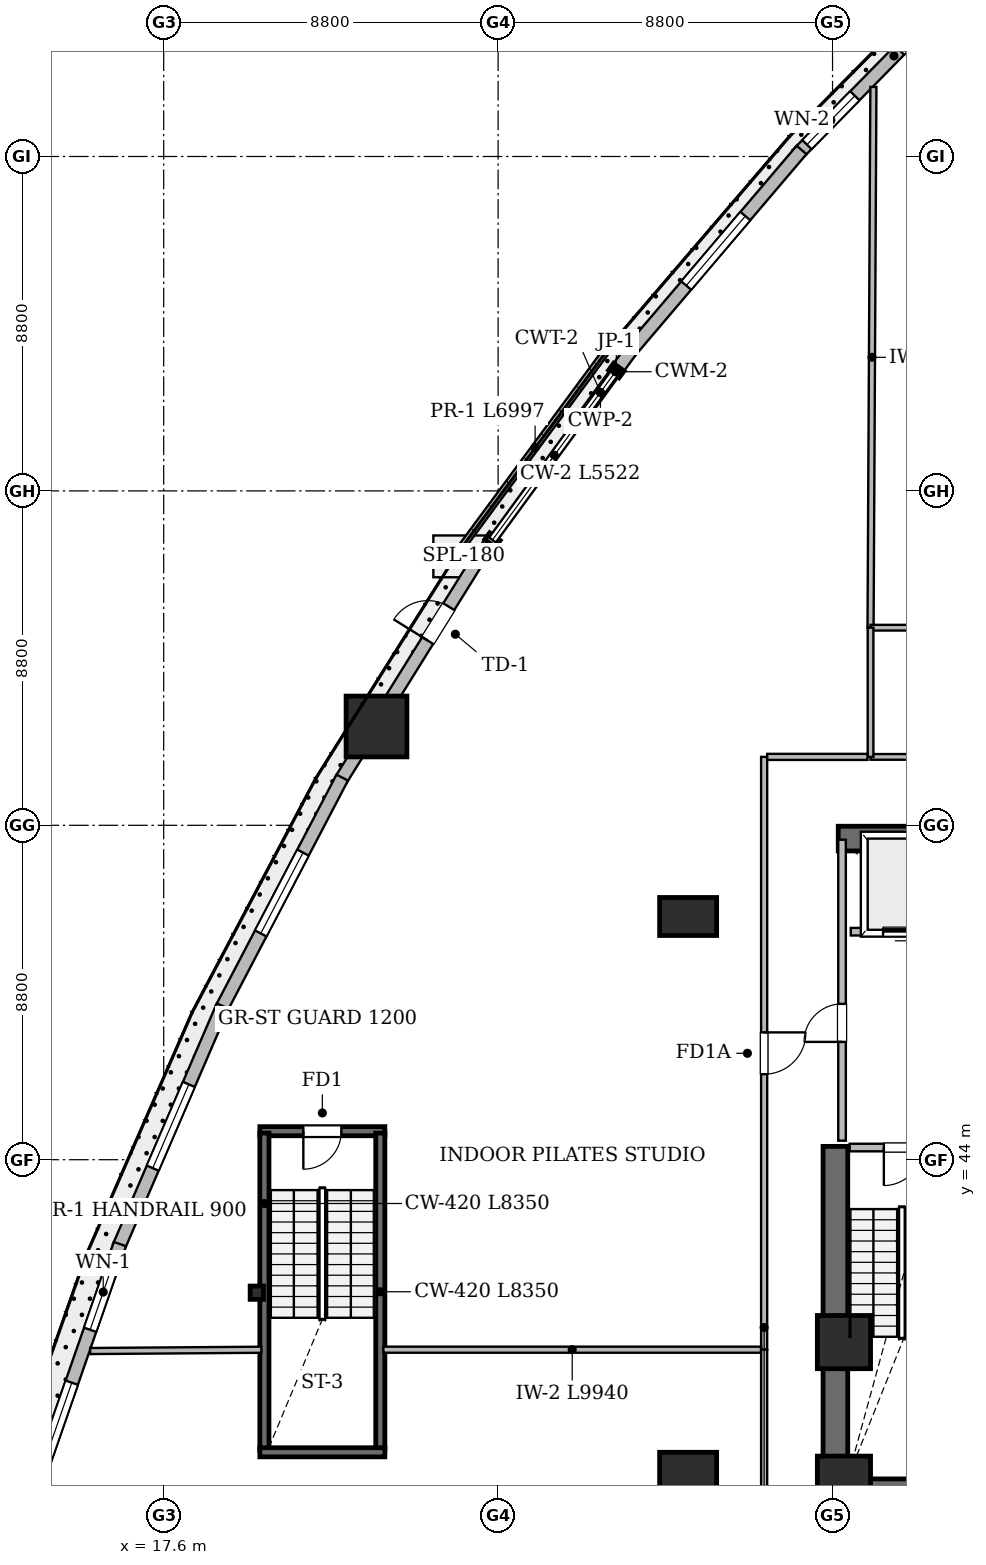
"""IFC4 building model, lengths in metres.
Left out: names, types, materials, properties, quantities, classifications, styles, units other than length and angle.
Written with IfcOpenShell. Run it as: python <this file> out.ifc"""

import sys

from ifc_helpers import new_model, si_unit, direction, frame, frame_2d, origin, origin_2d, place, context, subcontext, project, spatial, rectangle, i_section, extrude, element, fill, save


model = new_model("IFC4")
c1 = context("Model", 3, precision=1e-05, world=origin(), true_north=direction((0.0, 1.0)))
c2 = subcontext(c1, "Body", "Model", "MODEL_VIEW")
j1 = project(units=[si_unit("LENGTHUNIT", "METRE"), si_unit("PLANEANGLEUNIT", "RADIAN")], contexts=[c1])
p1 = place(None, origin())
s1 = spatial("IfcSite", under=j1, at=p1, CompositionType="ELEMENT")
p2 = place(p1, origin())
s2 = spatial("IfcBuilding", under=s1, at=p2, CompositionType="ELEMENT")
p3 = place(p2, frame((0.0, 0.0, 14.4)))
s3 = spatial("IfcBuildingStorey", under=s2, at=p3, CompositionType="ELEMENT", Elevation=14.4)
p4 = place(p3, frame((35.35, 52.45, 0.0), z_axis=(0.0, 0.0, 1.0), x_axis=(1.0, 0.0, 0.0)))
e1 = element("IfcWall", 1, at=p4, inside=s3, PredefinedType="SHEAR", context=c2, shape_type="SweptSolid", body=[
    extrude(rectangle(XDim=17.3, YDim=0.65, at=frame_2d((8.65, 0.0))), origin(), (0.0, 0.0, 1.0), 4.5),
])
p5 = place(p3, frame((34.95, 35.275, 0.0), z_axis=(0.0, 0.0, 1.0), x_axis=(1.0, 0.0, 0.0)))
e2 = element("IfcWall", 2, at=p5, inside=s3, PredefinedType="SHEAR", context=c2, shape_type="SweptSolid", body=[
    extrude(rectangle(XDim=4.15, YDim=0.65, at=frame_2d((2.075, 0.0))), origin(), (0.0, 0.0, 1.0), 4.5),
])
p6 = place(p3, frame((35.275, 34.95, 0.0), z_axis=(0.0, 0.0, 1.0), x_axis=(0.0, 1.0, 0.0)))
e3 = element("IfcWall", 3, at=p6, inside=s3, PredefinedType="SHEAR", context=c2, shape_type="SweptSolid", body=[
    extrude(rectangle(XDim=9.4, YDim=0.65, at=frame_2d((4.7, 0.0))), origin(), (0.0, 0.0, 1.0), 4.5),
])
for number, where, z_axis, x_axis in (
    (4, (35.5, 35.5, 0.0), (0.0, 0.0, 1.0), (1.0, 0.0, 0.0)),
    (5, (35.5, 39.2, 0.0), (0.0, 0.0, 1.0), (1.0, 0.0, 0.0)),
):
    element("IfcColumn", number, at=place(p3, frame(where, z_axis=z_axis, x_axis=x_axis)), inside=s3, PredefinedType="COLUMN", context=c2, shape_type="SweptSolid", body=[
        extrude(rectangle(XDim=1.4, YDim=1.4, at=origin_2d()), origin(), (0.0, 0.0, 1.0), 4.8),
    ])
for number, where, z_axis, x_axis in (
    (6, (31.4, 35.8, 0.0), (0.0, 0.0, 1.0), (1.0, 0.0, 0.0)),
    (7, (31.4, 50.4, 0.0), (0.0, 0.0, 1.0), (1.0, 0.0, 0.0)),
):
    element("IfcColumn", number, at=place(p3, frame(where, z_axis=z_axis, x_axis=x_axis)), inside=s3, PredefinedType="COLUMN", context=c2, shape_type="SweptSolid", body=[
        extrude(rectangle(XDim=1.5, YDim=1.0, at=origin_2d()), origin(), (0.0, 0.0, 1.0), 4.8),
    ])
p7 = place(p3, frame((23.2, 55.4, 0.0), z_axis=(0.0, 0.0, 1.0), x_axis=(1.0, 0.0, 0.0)))
e8 = element("IfcColumn", 8, at=p7, inside=s3, PredefinedType="COLUMN", context=c2, shape_type="SweptSolid", body=[
    extrude(rectangle(XDim=1.6, YDim=1.6, at=origin_2d()), origin(), (0.0, 0.0, 1.0), 4.8),
])
p8 = place(p3, frame((20.05, 40.5, 0.0), z_axis=(0.0, 0.0, 1.0), x_axis=(1.0, 0.0, 0.0)))
e9 = element("IfcColumn", 9, at=p8, inside=s3, PredefinedType="PILASTER", context=c2, shape_type="SweptSolid", body=[
    extrude(i_section(OverallWidth=0.35, OverallDepth=0.35, WebThickness=0.012, FlangeThickness=0.019, FilletRadius=0.02, at=origin_2d()), origin(), (0.0, 0.0, 1.0), 4.8),
])
p9 = place(p3, frame((39.296, 75.573, 0.0), z_axis=(0.0, 0.0, 1.0), x_axis=(-0.700436812806, -0.713714418564, 0.0)))
e10 = element("IfcWall", 10, at=p9, inside=s3, PredefinedType="SOLIDWALL", context=c2, shape_type="SweptSolid", body=[
    extrude(rectangle(XDim=7.079, YDim=0.34, at=frame_2d((3.54, 0.0))), origin(), (0.0, 0.0, 1.0), 4.5),
])
p10 = place(p9, frame((0.931, 0.0, 0.75)))
e11 = element("IfcOpeningElement", 11, at=p10, cuts=e10, PredefinedType="OPENING", context=c2, shape_type="SweptSolid", body=[
    extrude(rectangle(XDim=2.4, YDim=2.2, at=frame_2d((1.2, 1.1))), frame((0.0, 0.18, 0.0), z_axis=(0.0, -1.0, 0.0), x_axis=(1.0, 0.0, 0.0)), (0.0, 0.0, 1.0), 0.36),
])
p11 = place(p9, frame((5.01, 0.0, 0.8)))
e12 = element("IfcOpeningElement", 12, at=p11, cuts=e10, PredefinedType="OPENING", context=c2, shape_type="SweptSolid", body=[
    extrude(rectangle(XDim=1.8, YDim=1.65, at=frame_2d((0.9, 0.825))), frame((0.0, 0.18, 0.0), z_axis=(0.0, -1.0, 0.0), x_axis=(1.0, 0.0, 0.0)), (0.0, 0.0, 1.0), 0.36),
])
p12 = place(p3, frame((34.385, 70.572, 0.0), z_axis=(0.0, 0.0, 1.0), x_axis=(-0.6477796117, -0.761827785439, 0.0)))
e13 = element("IfcWall", 13, at=p12, inside=s3, PredefinedType="SOLIDWALL", context=c2, shape_type="SweptSolid", body=[
    extrude(rectangle(XDim=6.968, YDim=0.34, at=frame_2d((3.484, 0.0))), origin(), (0.0, 0.0, 1.0), 4.5),
])
p13 = place(p12, frame((2.284, 0.0, 0.75)))
e14 = element("IfcOpeningElement", 14, at=p13, cuts=e13, PredefinedType="OPENING", context=c2, shape_type="SweptSolid", body=[
    extrude(rectangle(XDim=2.4, YDim=2.2, at=frame_2d((1.2, 1.1))), frame((0.0, 0.18, 0.0), z_axis=(0.0, -1.0, 0.0), x_axis=(1.0, 0.0, 0.0)), (0.0, 0.0, 1.0), 0.36),
])
p14 = place(p3, frame((29.915, 65.319, 0.0), z_axis=(0.0, 0.0, 1.0), x_axis=(-0.590146831247, -0.807295929365, 0.0)))
e15 = element("IfcWall", 15, at=p14, inside=s3, PredefinedType="SOLIDWALL", context=c2, shape_type="SweptSolid", body=[
    extrude(rectangle(XDim=0.705, YDim=0.34, at=frame_2d((0.353, 0.0))), origin(), (0.0, 0.0, 1.0), 4.5),
])
p15 = place(p3, frame((26.263, 60.324, 0.0), z_axis=(0.0, 0.0, 1.0), x_axis=(-0.590268133047, -0.807207241735, 0.0)))
e16 = element("IfcWall", 16, at=p15, inside=s3, PredefinedType="SOLIDWALL", context=c2, shape_type="SweptSolid", body=[
    extrude(rectangle(XDim=0.706, YDim=0.34, at=frame_2d((0.353, 0.0))), origin(), (0.0, 0.0, 1.0), 4.5),
])
p16 = place(p3, frame((25.886, 59.813, 0.0), z_axis=(0.0, 0.0, 1.0), x_axis=(-0.528464497626, -0.848955402097, 0.0)))
e17 = element("IfcWall", 17, at=p16, inside=s3, PredefinedType="SOLIDWALL", context=c2, shape_type="SweptSolid", body=[
    extrude(rectangle(XDim=6.854, YDim=0.34, at=frame_2d((3.427, 0.0))), origin(), (0.0, 0.0, 1.0), 3.688),
])
p17 = place(p16, frame((1.483, 0.0, 0.0)))
e18 = element("IfcOpeningElement", 18, at=p17, cuts=e17, PredefinedType="OPENING", context=c2, shape_type="SweptSolid", body=[
    extrude(rectangle(XDim=1.05, YDim=2.15, at=frame_2d((0.525, 1.075))), frame((0.0, 0.18, 0.0), z_axis=(0.0, -1.0, 0.0), x_axis=(1.0, 0.0, 0.0)), (0.0, 0.0, 1.0), 0.36),
])
p18 = place(p3, frame((22.298, 54.055, 0.0), z_axis=(0.0, 0.0, 1.0), x_axis=(-0.463368013034, -0.886165946365, 0.0)))
e19 = element("IfcWall", 19, at=p18, inside=s3, PredefinedType="SOLIDWALL", context=c2, shape_type="SweptSolid", body=[
    extrude(rectangle(XDim=6.854, YDim=0.34, at=frame_2d((3.427, 0.0))), origin(), (0.0, 0.0, 1.0), 4.5),
])
p19 = place(p18, frame((2.227, 0.0, 0.75)))
e20 = element("IfcOpeningElement", 20, at=p19, cuts=e19, PredefinedType="OPENING", context=c2, shape_type="SweptSolid", body=[
    extrude(rectangle(XDim=2.4, YDim=2.2, at=frame_2d((1.2, 1.1))), frame((0.0, 0.18, 0.0), z_axis=(0.0, -1.0, 0.0), x_axis=(1.0, 0.0, 0.0)), (0.0, 0.0, 1.0), 0.36),
])
p20 = place(p3, frame((19.152, 48.044, 0.0), z_axis=(0.0, 0.0, 1.0), x_axis=(-0.396089940266, -0.91821171808, 0.0)))
e21 = element("IfcWall", 21, at=p20, inside=s3, PredefinedType="SOLIDWALL", context=c2, shape_type="SweptSolid", body=[
    extrude(rectangle(XDim=6.892, YDim=0.34, at=frame_2d((3.446, 0.0))), origin(), (0.0, 0.0, 1.0), 4.5),
])
p21 = place(p20, frame((2.246, 0.0, 0.75)))
e22 = element("IfcOpeningElement", 22, at=p21, cuts=e21, PredefinedType="OPENING", context=c2, shape_type="SweptSolid", body=[
    extrude(rectangle(XDim=2.4, YDim=2.2, at=frame_2d((1.2, 1.1))), frame((0.0, 0.18, 0.0), z_axis=(0.0, -1.0, 0.0), x_axis=(1.0, 0.0, 0.0)), (0.0, 0.0, 1.0), 0.36),
])
p22 = place(p3, frame((16.448, 41.781, 0.0), z_axis=(0.0, 0.0, 1.0), x_axis=(-0.327819293653, -0.944740446212, 0.0)))
e23 = element("IfcWall", 23, at=p22, inside=s3, PredefinedType="SOLIDWALL", context=c2, shape_type="SweptSolid", body=[
    extrude(rectangle(XDim=6.968, YDim=0.34, at=frame_2d((3.484, 0.0))), origin(), (0.0, 0.0, 1.0), 4.5),
])
p23 = place(p22, frame((0.288, 0.0, 0.8)))
e24 = element("IfcOpeningElement", 24, at=p23, cuts=e23, PredefinedType="OPENING", context=c2, shape_type="SweptSolid", body=[
    extrude(rectangle(XDim=2.1, YDim=1.7, at=frame_2d((1.05, 0.85))), frame((0.0, 0.18, 0.0), z_axis=(0.0, -1.0, 0.0), x_axis=(1.0, 0.0, 0.0)), (0.0, 0.0, 1.0), 0.36),
])
p24 = place(p22, frame((3.862, 0.0, 0.75)))
e25 = element("IfcOpeningElement", 25, at=p24, cuts=e23, PredefinedType="OPENING", context=c2, shape_type="SweptSolid", body=[
    extrude(rectangle(XDim=2.4, YDim=2.2, at=frame_2d((1.2, 1.1))), frame((0.0, 0.18, 0.0), z_axis=(0.0, -1.0, 0.0), x_axis=(1.0, 0.0, 0.0)), (0.0, 0.0, 1.0), 0.36),
])
p25 = place(p3, frame((29.451, 65.558, 0.0), z_axis=(0.0, 0.0, 1.0), x_axis=(-0.593678581032, -0.804702269429, 0.0)))
e26 = element("IfcWall", 26, at=p25, inside=s3, PredefinedType="PARAPET", context=c2, shape_type="SweptSolid", body=[
    extrude(rectangle(XDim=6.997, YDim=0.18, at=frame_2d((3.499, 0.0))), origin(), (0.0, 0.0, 1.0), 0.45),
])
p26 = place(p3, frame((20.13, 44.75, 0.0), z_axis=(0.0, 0.0, 1.0), x_axis=(1.0, 0.0, 0.0)))
e27 = element("IfcWall", 27, at=p26, inside=s3, PredefinedType="SHEAR", context=c2, shape_type="SweptSolid", body=[
    extrude(rectangle(XDim=3.29, YDim=0.24, at=frame_2d((1.645, 0.0))), origin(), (0.0, 0.0, 1.0), 4.5),
])
p27 = place(p26, frame((1.145, 0.0, 0.0)))
e28 = element("IfcOpeningElement", 28, at=p27, cuts=e27, PredefinedType="OPENING", context=c2, shape_type="SweptSolid", body=[
    extrude(rectangle(XDim=1.0, YDim=2.15, at=frame_2d((0.5, 1.075))), frame((0.0, 0.13, 0.0), z_axis=(0.0, -1.0, 0.0), x_axis=(1.0, 0.0, 0.0)), (0.0, 0.0, 1.0), 0.26),
])
for number, where, z_axis, x_axis in (
    (29, (20.25, 36.35, 0.0), (0.0, 0.0, 1.0), (0.0, 1.0, 0.0)),
    (30, (23.3, 36.35, 0.0), (0.0, 0.0, 1.0), (0.0, 1.0, 0.0)),
):
    element("IfcWall", number, at=place(p3, frame(where, z_axis=z_axis, x_axis=x_axis)), inside=s3, PredefinedType="SHEAR", context=c2, shape_type="SweptSolid", body=[
        extrude(rectangle(XDim=8.35, YDim=0.24, at=frame_2d((4.175, 0.0))), origin(), (0.0, 0.0, 1.0), 4.5),
    ])
p28 = place(p3, frame((20.13, 36.3, 0.0), z_axis=(0.0, 0.0, 1.0), x_axis=(1.0, 0.0, 0.0)))
e31 = element("IfcWall", 31, at=p28, inside=s3, PredefinedType="SHEAR", context=c2, shape_type="SweptSolid", body=[
    extrude(rectangle(XDim=3.29, YDim=0.24, at=frame_2d((1.645, 0.0))), origin(), (0.0, 0.0, 1.0), 4.5),
])
p29 = place(p3, frame((33.4, 54.6, 0.0), z_axis=(0.0, 0.0, 1.0), x_axis=(0.0, -1.0, 0.0)))
e32 = element("IfcWall", 32, at=p29, inside=s3, PredefinedType="SOLIDWALL", context=c2, shape_type="SweptSolid", body=[
    extrude(rectangle(XDim=15.6, YDim=0.16, at=frame_2d((7.8, 0.0))), origin(), (0.0, 0.0, 1.0), 3.688),
])
p30 = place(p29, frame((7.25, 0.0, 0.0)))
e33 = element("IfcOpeningElement", 33, at=p30, cuts=e32, PredefinedType="OPENING", context=c2, shape_type="SweptSolid", body=[
    extrude(rectangle(XDim=1.1, YDim=2.15, at=frame_2d((0.55, 1.075))), frame((0.0, 0.09, 0.0), z_axis=(0.0, -1.0, 0.0), x_axis=(1.0, 0.0, 0.0)), (0.0, 0.0, 1.0), 0.18),
])
p31 = place(p3, frame((35.45, 44.5, 0.0), z_axis=(0.0, 0.0, 1.0), x_axis=(0.0, 1.0, 0.0)))
e34 = element("IfcWall", 34, at=p31, inside=s3, PredefinedType="SOLIDWALL", context=c2, shape_type="SweptSolid", body=[
    extrude(rectangle(XDim=7.92, YDim=0.2, at=frame_2d((3.96, 0.0))), origin(), (0.0, 0.0, 1.0), 4.5),
])
p32 = place(p31, frame((2.6, 0.0, 0.0)))
e35 = element("IfcOpeningElement", 35, at=p32, cuts=e34, PredefinedType="OPENING", context=c2, shape_type="SweptSolid", body=[
    extrude(rectangle(XDim=1.0, YDim=2.15, at=frame_2d((0.5, 1.075))), frame((0.0, 0.11, 0.0), z_axis=(0.0, -1.0, 0.0), x_axis=(1.0, 0.0, 0.0)), (0.0, 0.0, 1.0), 0.22),
])
p33 = place(p3, frame((40.0, 54.6, 0.0), z_axis=(0.0, 0.0, 1.0), x_axis=(-1.0, 0.0, 0.0)))
e36 = element("IfcWall", 36, at=p33, inside=s3, PredefinedType="PLUMBINGWALL", context=c2, shape_type="SweptSolid", body=[
    extrude(rectangle(XDim=3.8, YDim=0.15, at=frame_2d((1.9, 0.0))), origin(), (0.0, 0.0, 1.0), 3.688),
])
p34 = place(p33, frame((1.45, 0.0, 0.0)))
e37 = element("IfcOpeningElement", 37, at=p34, cuts=e36, PredefinedType="OPENING", context=c2, shape_type="SweptSolid", body=[
    extrude(rectangle(XDim=0.9, YDim=2.1, at=frame_2d((0.45, 1.05))), frame((0.0, 0.085, 0.0), z_axis=(0.0, -1.0, 0.0), x_axis=(1.0, 0.0, 0.0)), (0.0, 0.0, 1.0), 0.17),
])
p35 = place(p3, frame((35.65, 44.32, 0.0), z_axis=(0.0, 0.0, 1.0), x_axis=(1.0, 0.0, 0.0)))
e38 = element("IfcWall", 38, at=p35, inside=s3, PredefinedType="SOLIDWALL", context=c2, shape_type="SweptSolid", body=[
    extrude(rectangle(XDim=2.8, YDim=0.2, at=frame_2d((1.4, 0.0))), origin(), (0.0, 0.0, 1.0), 4.5),
])
p36 = place(p35, frame((0.9, 0.0, 0.0)))
e39 = element("IfcOpeningElement", 39, at=p36, cuts=e38, PredefinedType="OPENING", context=c2, shape_type="SweptSolid", body=[
    extrude(rectangle(XDim=1.0, YDim=2.15, at=frame_2d((0.5, 1.075))), frame((0.0, 0.11, 0.0), z_axis=(0.0, -1.0, 0.0), x_axis=(1.0, 0.0, 0.0)), (0.0, 0.0, 1.0), 0.22),
])
p37 = place(p3, frame((35.68, 50.0, 0.0), z_axis=(0.0, 0.0, 1.0), x_axis=(1.0, 0.0, 0.0)))
e40 = element("IfcWall", 40, at=p37, inside=s3, PredefinedType="SOLIDWALL", context=c2, shape_type="SweptSolid", body=[
    extrude(rectangle(XDim=2.8, YDim=0.2, at=frame_2d((1.4, 0.0))), origin(), (0.0, 0.0, 1.0), 4.5),
])
p38 = place(p37, frame((0.85, 0.0, 0.0)))
e41 = element("IfcOpeningElement", 41, at=p38, cuts=e40, PredefinedType="OPENING", context=c2, shape_type="SweptSolid", body=[
    extrude(rectangle(XDim=1.1, YDim=2.15, at=frame_2d((0.55, 1.075))), frame((0.0, 0.11, 0.0), z_axis=(0.0, -1.0, 0.0), x_axis=(1.0, 0.0, 0.0)), (0.0, 0.0, 1.0), 0.22),
])
p39 = place(p3, frame((36.2, 58.0, 0.0), z_axis=(0.0, 0.0, 1.0), x_axis=(0.005266696555, 0.999986130858, 0.0)))
e42 = element("IfcWall", 42, at=p39, inside=s3, PredefinedType="SOLIDWALL", context=c2, shape_type="SweptSolid", body=[
    extrude(rectangle(XDim=14.231, YDim=0.16, at=frame_2d((7.116, 0.0))), origin(), (0.0, 0.0, 1.0), 3.788),
])
p40 = place(p3, frame((33.32, 39.0, 0.0), z_axis=(0.0, 0.0, 1.0), x_axis=(-1.0, 0.0, 0.0)))
e43 = element("IfcWall", 43, at=p40, inside=s3, PredefinedType="SOLIDWALL", context=c2, shape_type="SweptSolid", body=[
    extrude(rectangle(XDim=9.94, YDim=0.16, at=frame_2d((4.97, 0.0))), origin(), (0.0, 0.0, 1.0), 3.688),
])
p41 = place(p3, frame((33.4, 39.0, 0.0), z_axis=(0.0, 0.0, 1.0), x_axis=(0.0, -1.0, 0.0)))
e44 = element("IfcWall", 44, at=p41, inside=s3, PredefinedType="SOLIDWALL", context=c2, shape_type="SweptSolid", body=[
    extrude(rectangle(XDim=5.6, YDim=0.16, at=frame_2d((2.8, 0.0))), origin(), (0.0, 0.0, 1.0), 3.688),
])
p42 = place(p3, frame((20.17, 38.999, 0.0), z_axis=(0.0, 0.0, 1.0), x_axis=(-0.999971615416, -0.007534478238, 0.0)))
e45 = element("IfcWall", 45, at=p42, inside=s3, PredefinedType="SOLIDWALL", context=c2, shape_type="SweptSolid", body=[
    extrude(rectangle(XDim=4.504, YDim=0.16, at=frame_2d((2.252, 0.0))), origin(), (0.0, 0.0, 1.0), 4.5),
])
p43 = place(p3, frame((40.0, 58.0, 0.0), z_axis=(0.0, 0.0, 1.0), x_axis=(-1.0, 0.0, 0.0)))
e46 = element("IfcWall", 46, at=p43, inside=s3, PredefinedType="PLUMBINGWALL", context=c2, shape_type="SweptSolid", body=[
    extrude(rectangle(XDim=3.8, YDim=0.15, at=frame_2d((1.9, 0.0))), origin(), (0.0, 0.0, 1.0), 4.5),
])
p44 = place(p3, frame((36.2, 58.0, 0.0), z_axis=(0.0, 0.0, 1.0), x_axis=(0.0, -1.0, 0.0)))
e47 = element("IfcWall", 47, at=p44, inside=s3, PredefinedType="PLUMBINGWALL", context=c2, shape_type="SweptSolid", body=[
    extrude(rectangle(XDim=3.4, YDim=0.15, at=frame_2d((1.7, 0.0))), origin(), (0.0, 0.0, 1.0), 4.5),
])
p45 = place(p3, frame((36.12, 54.6, 0.0), z_axis=(0.0, 0.0, 1.0), x_axis=(-1.0, 0.0, 0.0)))
e48 = element("IfcWall", 48, at=p45, inside=s3, PredefinedType="SOLIDWALL", context=c2, shape_type="SweptSolid", body=[
    extrude(rectangle(XDim=2.64, YDim=0.16, at=frame_2d((1.32, 0.0))), origin(), (0.0, 0.0, 1.0), 4.5),
])
p46 = place(p11, origin())
e49 = element("IfcWindow", 49, at=p46, inside=s3, PartitioningType="SINGLE_PANEL", PredefinedType="WINDOW", context=c2, shape_type="SweptSolid", body=[
    extrude(rectangle(XDim=1.8, YDim=1.65, at=frame_2d((0.9, 0.825))), frame((0.0, 0.03, 0.0), z_axis=(0.0, -1.0, 0.0), x_axis=(1.0, 0.0, 0.0)), (0.0, 0.0, 1.0), 0.06),
])
fill(e12, e49)
p47 = place(p13, origin())
e50 = element("IfcWindow", 50, at=p47, inside=s3, PartitioningType="SINGLE_PANEL", PredefinedType="WINDOW", context=c2, shape_type="SweptSolid", body=[
    extrude(rectangle(XDim=2.4, YDim=2.2, at=frame_2d((1.2, 1.1))), frame((0.0, 0.03, 0.0), z_axis=(0.0, -1.0, 0.0), x_axis=(1.0, 0.0, 0.0)), (0.0, 0.0, 1.0), 0.06),
])
fill(e14, e50)
p48 = place(p17, frame((1.05, 0.0, 0.0), z_axis=(0.0, 0.0, 1.0), x_axis=(-1.0, 0.0, 0.0)))
e51 = element("IfcDoor", 51, at=p48, inside=s3, OperationType="SINGLE_SWING_RIGHT", PredefinedType="DOOR", context=c2, shape_type="SweptSolid", body=[
    extrude(rectangle(XDim=1.05, YDim=2.15, at=frame_2d((0.525, 1.075))), frame((0.0, 0.025, 0.0), z_axis=(0.0, -1.0, 0.0), x_axis=(1.0, 0.0, 0.0)), (0.0, 0.0, 1.0), 0.05),
])
fill(e18, e51)
p49 = place(p19, origin())
e52 = element("IfcWindow", 52, at=p49, inside=s3, PartitioningType="SINGLE_PANEL", PredefinedType="WINDOW", context=c2, shape_type="SweptSolid", body=[
    extrude(rectangle(XDim=2.4, YDim=2.2, at=frame_2d((1.2, 1.1))), frame((0.0, 0.03, 0.0), z_axis=(0.0, -1.0, 0.0), x_axis=(1.0, 0.0, 0.0)), (0.0, 0.0, 1.0), 0.06),
])
fill(e20, e52)
p50 = place(p21, origin())
e53 = element("IfcWindow", 53, at=p50, inside=s3, PartitioningType="SINGLE_PANEL", PredefinedType="WINDOW", context=c2, shape_type="SweptSolid", body=[
    extrude(rectangle(XDim=2.4, YDim=2.2, at=frame_2d((1.2, 1.1))), frame((0.0, 0.03, 0.0), z_axis=(0.0, -1.0, 0.0), x_axis=(1.0, 0.0, 0.0)), (0.0, 0.0, 1.0), 0.06),
])
fill(e22, e53)
p51 = place(p23, origin())
e54 = element("IfcWindow", 54, at=p51, inside=s3, PartitioningType="SINGLE_PANEL", PredefinedType="WINDOW", context=c2, shape_type="SweptSolid", body=[
    extrude(rectangle(XDim=2.1, YDim=1.7, at=frame_2d((1.05, 0.85))), frame((0.0, 0.03, 0.0), z_axis=(0.0, -1.0, 0.0), x_axis=(1.0, 0.0, 0.0)), (0.0, 0.0, 1.0), 0.06),
])
fill(e24, e54)
p52 = place(p24, origin())
e55 = element("IfcWindow", 55, at=p52, inside=s3, PartitioningType="SINGLE_PANEL", PredefinedType="WINDOW", context=c2, shape_type="SweptSolid", body=[
    extrude(rectangle(XDim=2.4, YDim=2.2, at=frame_2d((1.2, 1.1))), frame((0.0, 0.03, 0.0), z_axis=(0.0, -1.0, 0.0), x_axis=(1.0, 0.0, 0.0)), (0.0, 0.0, 1.0), 0.06),
])
fill(e25, e55)
p53 = place(p27, frame((1.0, 0.0, 0.0), z_axis=(0.0, 0.0, 1.0), x_axis=(-1.0, 0.0, 0.0)))
e56 = element("IfcDoor", 56, at=p53, inside=s3, OperationType="SINGLE_SWING_LEFT", PredefinedType="DOOR", context=c2, shape_type="SweptSolid", body=[
    extrude(rectangle(XDim=1.0, YDim=2.15, at=frame_2d((0.5, 1.075))), frame((0.0, 0.025, 0.0), z_axis=(0.0, -1.0, 0.0), x_axis=(1.0, 0.0, 0.0)), (0.0, 0.0, 1.0), 0.05),
])
fill(e28, e56)
p54 = place(p36, frame((1.0, 0.0, 0.0), z_axis=(0.0, 0.0, 1.0), x_axis=(-1.0, 0.0, 0.0)))
e57 = element("IfcDoor", 57, at=p54, inside=s3, OperationType="SINGLE_SWING_LEFT", PredefinedType="DOOR", context=c2, shape_type="SweptSolid", body=[
    extrude(rectangle(XDim=1.0, YDim=2.15, at=frame_2d((0.5, 1.075))), frame((0.0, 0.025, 0.0), z_axis=(0.0, -1.0, 0.0), x_axis=(1.0, 0.0, 0.0)), (0.0, 0.0, 1.0), 0.05),
])
fill(e39, e57)
p55 = place(p32, origin())
e58 = element("IfcDoor", 58, at=p55, inside=s3, OperationType="SINGLE_SWING_LEFT", PredefinedType="DOOR", context=c2, shape_type="SweptSolid", body=[
    extrude(rectangle(XDim=1.0, YDim=2.15, at=frame_2d((0.5, 1.075))), frame((0.0, 0.025, 0.0), z_axis=(0.0, -1.0, 0.0), x_axis=(1.0, 0.0, 0.0)), (0.0, 0.0, 1.0), 0.05),
])
fill(e35, e58)
p56 = place(p38, origin())
e59 = element("IfcDoor", 59, at=p56, inside=s3, OperationType="SLIDING_TO_LEFT", PredefinedType="DOOR", context=c2, shape_type="SweptSolid", body=[
    extrude(rectangle(XDim=1.1, YDim=2.15, at=frame_2d((0.55, 1.075))), frame((0.0, 0.025, 0.0), z_axis=(0.0, -1.0, 0.0), x_axis=(1.0, 0.0, 0.0)), (0.0, 0.0, 1.0), 0.05),
])
fill(e41, e59)
p57 = place(p30, origin())
e60 = element("IfcDoor", 60, at=p57, inside=s3, OperationType="SINGLE_SWING_LEFT", PredefinedType="DOOR", context=c2, shape_type="SweptSolid", body=[
    extrude(rectangle(XDim=1.1, YDim=2.15, at=frame_2d((0.55, 1.075))), frame((0.0, 0.025, 0.0), z_axis=(0.0, -1.0, 0.0), x_axis=(1.0, 0.0, 0.0)), (0.0, 0.0, 1.0), 0.05),
])
fill(e33, e60)
save(model, sys.argv[1])
